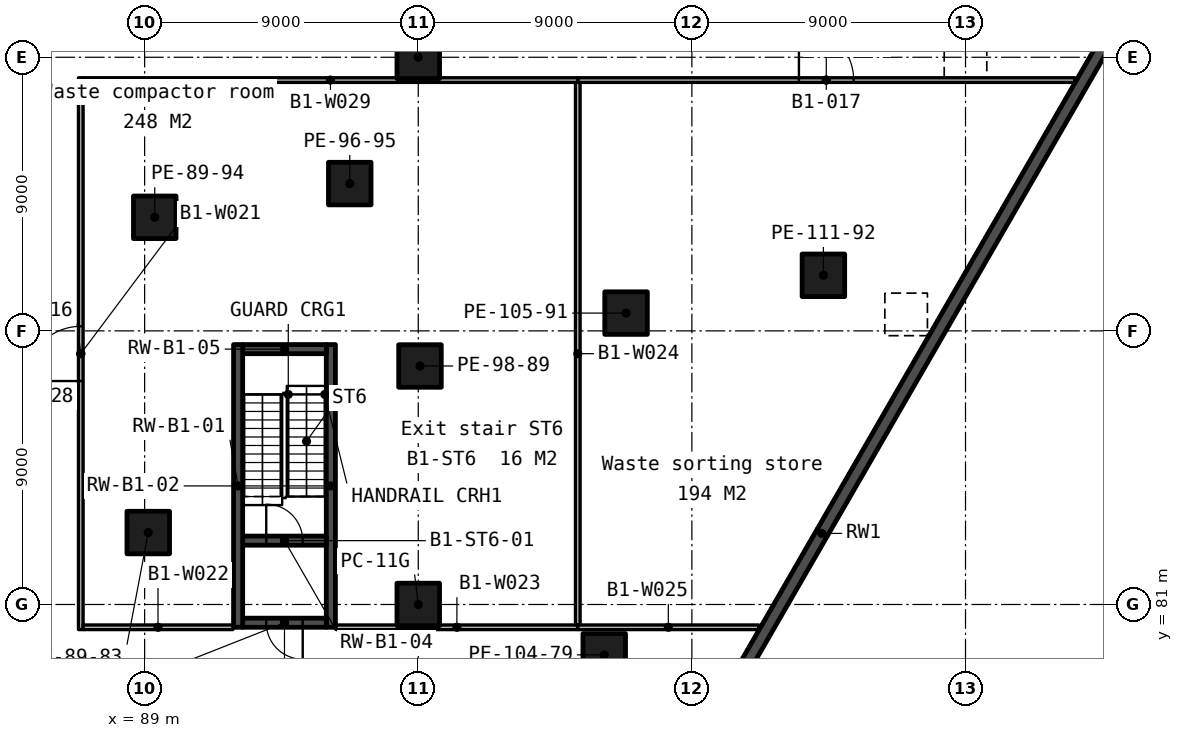
"""IFC4 building model, lengths in metres.
Left out: names, types, materials, properties, quantities, classifications, styles, units other than length and angle.
Written with IfcOpenShell. Run it as: python <this file> out.ifc"""

import sys

from ifc_helpers import new_model, si_unit, direction, frame, frame_2d, origin, origin_2d, place, context, subcontext, project, spatial, rectangle, extrude, element, fill, save


model = new_model("IFC4")
c1 = context("Model", 3, precision=1e-05, world=origin(), true_north=direction((0.0, 1.0)))
c2 = subcontext(c1, "Body", "Model", "MODEL_VIEW")
j1 = project(units=[si_unit("LENGTHUNIT", "METRE"), si_unit("PLANEANGLEUNIT", "RADIAN")], contexts=[c1])
p1 = place(None, origin())
s1 = spatial("IfcSite", under=j1, at=p1, CompositionType="ELEMENT")
p2 = place(p1, origin())
s2 = spatial("IfcBuilding", under=s1, at=p2, CompositionType="ELEMENT")
p3 = place(p2, frame((0.0, 0.0, -4.5)))
s3 = spatial("IfcBuildingStorey", under=s2, at=p3, CompositionType="ELEMENT", Elevation=-4.5)
p4 = place(p3, frame((137.688, 129.089, -0.25), z_axis=(0.0, 0.0, 1.0), x_axis=(-0.499999742059, -0.866025552707, 0.0)))
e1 = element("IfcWall", 1, at=p4, inside=s3, PredefinedType="SOLIDWALL", context=c2, shape_type="SweptSolid", body=[
    extrude(rectangle(XDim=105.659, YDim=0.4, at=frame_2d((52.829, 0.0))), origin(), (0.0, 0.0, 1.0), 4.45),
])
for number, where, z_axis, x_axis in (
    (2, (98.0, 99.0, 0.0), (0.0, 0.0, 1.0), (1.0, 0.0, 0.0)),
    (3, (98.0, 81.0, 0.0), (0.0, 0.0, 1.0), (1.0, 0.0, 0.0)),
    (4, (104.117, 79.343, 0.0), (0.0, 0.0, 1.0), (1.0, 0.0, 0.0)),
    (5, (104.835, 90.585, 0.0), (0.0, 0.0, 1.0), (1.0, 0.0, 0.0)),
    (6, (111.326, 91.828, 0.0), (0.0, 0.0, 1.0), (1.0, 0.0, 0.0)),
    (7, (89.119, 83.366, 0.0), (0.0, 0.0, 1.0), (1.0, 0.0, 0.0)),
    (8, (89.333, 93.736, 0.0), (0.0, 0.0, 1.0), (1.0, 0.0, 0.0)),
    (9, (95.747, 94.845, 0.0), (0.0, 0.0, 1.0), (1.0, 0.0, 0.0)),
    (10, (98.057, 88.845, 0.0), (0.0, 0.0, 1.0), (1.0, 0.0, 0.0)),
):
    element("IfcColumn", number, at=place(p3, frame(where, z_axis=z_axis, x_axis=x_axis)), inside=s3, PredefinedType="COLUMN", context=c2, shape_type="SweptSolid", body=[
        extrude(rectangle(XDim=1.4, YDim=1.4, at=origin_2d()), origin(), (0.0, 0.0, 1.0), 4.5),
    ])
for number, where, z_axis, x_axis in (
    (11, (92.075, 80.25, 0.0), (0.0, 0.0, 1.0), (0.0, 1.0, 0.0)),
    (12, (95.125, 80.25, 0.0), (0.0, 0.0, 1.0), (0.0, 1.0, 0.0)),
):
    element("IfcWall", number, at=place(p3, frame(where, z_axis=z_axis, x_axis=x_axis)), inside=s3, PredefinedType="SOLIDWALL", context=c2, shape_type="SweptSolid", body=[
        extrude(rectangle(XDim=9.3, YDim=0.3, at=frame_2d((4.65, 0.0))), origin(), (0.0, 0.0, 1.0), 4.2),
    ])
p5 = place(p3, frame((92.225, 80.4, 0.0), z_axis=(0.0, 0.0, 1.0), x_axis=(1.0, 0.0, 0.0)))
e13 = element("IfcWall", 13, at=p5, inside=s3, PredefinedType="SOLIDWALL", context=c2, shape_type="SweptSolid", body=[
    extrude(rectangle(XDim=2.75, YDim=0.3, at=frame_2d((1.375, 0.0))), origin(), (0.0, 0.0, 1.0), 4.2),
])
p6 = place(p5, frame((0.775, 0.0, 0.0)))
e14 = element("IfcOpeningElement", 14, at=p6, cuts=e13, PredefinedType="OPENING", context=c2, shape_type="SweptSolid", body=[
    extrude(rectangle(XDim=1.2, YDim=2.1, at=frame_2d((0.6, 1.05))), frame((0.0, 0.16, 0.0), z_axis=(0.0, -1.0, 0.0), x_axis=(1.0, 0.0, 0.0)), (0.0, 0.0, 1.0), 0.32),
])
p7 = place(p3, frame((92.225, 83.1, 0.0), z_axis=(0.0, 0.0, 1.0), x_axis=(1.0, 0.0, 0.0)))
e15 = element("IfcWall", 15, at=p7, inside=s3, PredefinedType="SOLIDWALL", context=c2, shape_type="SweptSolid", body=[
    extrude(rectangle(XDim=2.75, YDim=0.3, at=frame_2d((1.375, 0.0))), origin(), (0.0, 0.0, 1.0), 4.2),
])
p8 = place(p7, frame((0.775, 0.0, 0.0)))
e16 = element("IfcOpeningElement", 16, at=p8, cuts=e15, PredefinedType="OPENING", context=c2, shape_type="SweptSolid", body=[
    extrude(rectangle(XDim=1.2, YDim=2.1, at=frame_2d((0.6, 1.05))), frame((0.0, 0.16, 0.0), z_axis=(0.0, -1.0, 0.0), x_axis=(1.0, 0.0, 0.0)), (0.0, 0.0, 1.0), 0.32),
])
p9 = place(p3, frame((92.225, 89.4, 0.0), z_axis=(0.0, 0.0, 1.0), x_axis=(1.0, 0.0, 0.0)))
e17 = element("IfcWall", 17, at=p9, inside=s3, PredefinedType="SOLIDWALL", context=c2, shape_type="SweptSolid", body=[
    extrude(rectangle(XDim=2.75, YDim=0.3, at=frame_2d((1.375, 0.0))), origin(), (0.0, 0.0, 1.0), 4.2),
])
p10 = place(p3, frame((86.9, 80.175, 0.0), z_axis=(0.0, 0.0, 1.0), x_axis=(0.0, 1.0, 0.0)))
e18 = element("IfcWall", 18, at=p10, inside=s3, PredefinedType="PARTITIONING", context=c2, shape_type="SweptSolid", body=[
    extrude(rectangle(XDim=18.15, YDim=0.15, at=frame_2d((9.075, 0.0))), origin(), (0.0, 0.0, 1.0), 4.2),
])
p11 = place(p10, frame((8.175, 0.0, 0.0)))
e19 = element("IfcOpeningElement", 19, at=p11, cuts=e18, PredefinedType="OPENING", context=c2, shape_type="SweptSolid", body=[
    extrude(rectangle(XDim=1.8, YDim=2.1, at=frame_2d((0.9, 1.05))), frame((0.0, 0.085, 0.0), z_axis=(0.0, -1.0, 0.0), x_axis=(1.0, 0.0, 0.0)), (0.0, 0.0, 1.0), 0.17),
])
p12 = place(p3, frame((86.975, 80.25, 0.0), z_axis=(0.0, 0.0, 1.0), x_axis=(1.0, 0.0, 0.0)))
e20 = element("IfcWall", 20, at=p12, inside=s3, PredefinedType="PARTITIONING", context=c2, shape_type="SweptSolid", body=[
    extrude(rectangle(XDim=4.93, YDim=0.15, at=frame_2d((2.465, 0.0))), origin(), (0.0, 0.0, 1.0), 3.339),
])
p13 = place(p3, frame((95.295, 80.25, 0.0), z_axis=(0.0, 0.0, 1.0), x_axis=(1.0, 0.0, 0.0)))
e21 = element("IfcWall", 21, at=p13, inside=s3, PredefinedType="PARTITIONING", context=c2, shape_type="SweptSolid", body=[
    extrude(rectangle(XDim=7.952, YDim=0.15, at=frame_2d((3.976, 0.0))), origin(), (0.0, 0.0, 1.0), 3.339),
])
p14 = place(p3, frame((103.247, 80.325, 0.0), z_axis=(0.0, 0.0, 1.0), x_axis=(0.0, 1.0, 0.0)))
e22 = element("IfcWall", 22, at=p14, inside=s3, PredefinedType="PARTITIONING", context=c2, shape_type="SweptSolid", body=[
    extrude(rectangle(XDim=17.85, YDim=0.15, at=frame_2d((8.925, 0.0))), origin(), (0.0, 0.0, 1.0), 4.2),
])
p15 = place(p3, frame((103.247, 80.25, 0.0), z_axis=(0.0, 0.0, 1.0), x_axis=(1.0, 0.0, 0.0)))
e23 = element("IfcWall", 23, at=p15, inside=s3, PredefinedType="PARTITIONING", context=c2, shape_type="SweptSolid", body=[
    extrude(rectangle(XDim=5.955, YDim=0.15, at=frame_2d((2.978, 0.0))), origin(), (0.0, 0.0, 1.0), 4.2),
])
p16 = place(p3, frame((86.975, 98.25, 0.0), z_axis=(0.0, 0.0, 1.0), x_axis=(1.0, 0.0, 0.0)))
e24 = element("IfcWall", 24, at=p16, inside=s3, PredefinedType="PARTITIONING", context=c2, shape_type="SweptSolid", body=[
    extrude(rectangle(XDim=16.272, YDim=0.15, at=frame_2d((8.136, 0.0))), origin(), (0.0, 0.0, 1.0), 4.2),
])
p17 = place(p3, frame((103.247, 98.25, 0.0), z_axis=(0.0, 0.0, 1.0), x_axis=(1.0, 0.0, 0.0)))
e25 = element("IfcWall", 25, at=p17, inside=s3, PredefinedType="PARTITIONING", context=c2, shape_type="SweptSolid", body=[
    extrude(rectangle(XDim=16.347, YDim=0.15, at=frame_2d((8.174, 0.0))), origin(), (0.0, 0.0, 1.0), 4.2),
])
p18 = place(p17, frame((7.274, 0.0, 0.0)))
e26 = element("IfcOpeningElement", 26, at=p18, cuts=e25, PredefinedType="OPENING", context=c2, shape_type="SweptSolid", body=[
    extrude(rectangle(XDim=1.8, YDim=2.1, at=frame_2d((0.9, 1.05))), frame((0.0, 0.085, 0.0), z_axis=(0.0, -1.0, 0.0), x_axis=(1.0, 0.0, 0.0)), (0.0, 0.0, 1.0), 0.17),
])
p19 = place(p8, origin())
e27 = element("IfcDoor", 27, at=p19, inside=s3, OperationType="SINGLE_SWING_LEFT", PredefinedType="DOOR", context=c2, shape_type="SweptSolid", body=[
    extrude(rectangle(XDim=1.2, YDim=2.1, at=frame_2d((0.6, 1.05))), frame((0.0, 0.025, 0.0), z_axis=(0.0, -1.0, 0.0), x_axis=(1.0, 0.0, 0.0)), (0.0, 0.0, 1.0), 0.05),
])
fill(e16, e27)
p20 = place(p6, origin())
e28 = element("IfcDoor", 28, at=p20, inside=s3, OperationType="SINGLE_SWING_RIGHT", PredefinedType="DOOR", context=c2, shape_type="SweptSolid", body=[
    extrude(rectangle(XDim=1.2, YDim=2.1, at=frame_2d((0.6, 1.05))), frame((0.0, 0.025, 0.0), z_axis=(0.0, -1.0, 0.0), x_axis=(1.0, 0.0, 0.0)), (0.0, 0.0, 1.0), 0.05),
])
fill(e14, e28)
p21 = place(p11, origin())
e29 = element("IfcDoor", 29, at=p21, inside=s3, OperationType="SINGLE_SWING_LEFT", PredefinedType="DOOR", context=c2, shape_type="SweptSolid", body=[
    extrude(rectangle(XDim=1.8, YDim=2.1, at=frame_2d((0.9, 1.05))), frame((0.0, 0.025, 0.0), z_axis=(0.0, -1.0, 0.0), x_axis=(1.0, 0.0, 0.0)), (0.0, 0.0, 1.0), 0.05),
])
fill(e19, e29)
p22 = place(p18, origin())
e30 = element("IfcDoor", 30, at=p22, inside=s3, OperationType="SINGLE_SWING_LEFT", PredefinedType="DOOR", context=c2, shape_type="SweptSolid", body=[
    extrude(rectangle(XDim=1.8, YDim=2.1, at=frame_2d((0.9, 1.05))), frame((0.0, 0.025, 0.0), z_axis=(0.0, -1.0, 0.0), x_axis=(1.0, 0.0, 0.0)), (0.0, 0.0, 1.0), 0.05),
])
fill(e26, e30)
save(model, sys.argv[1])
